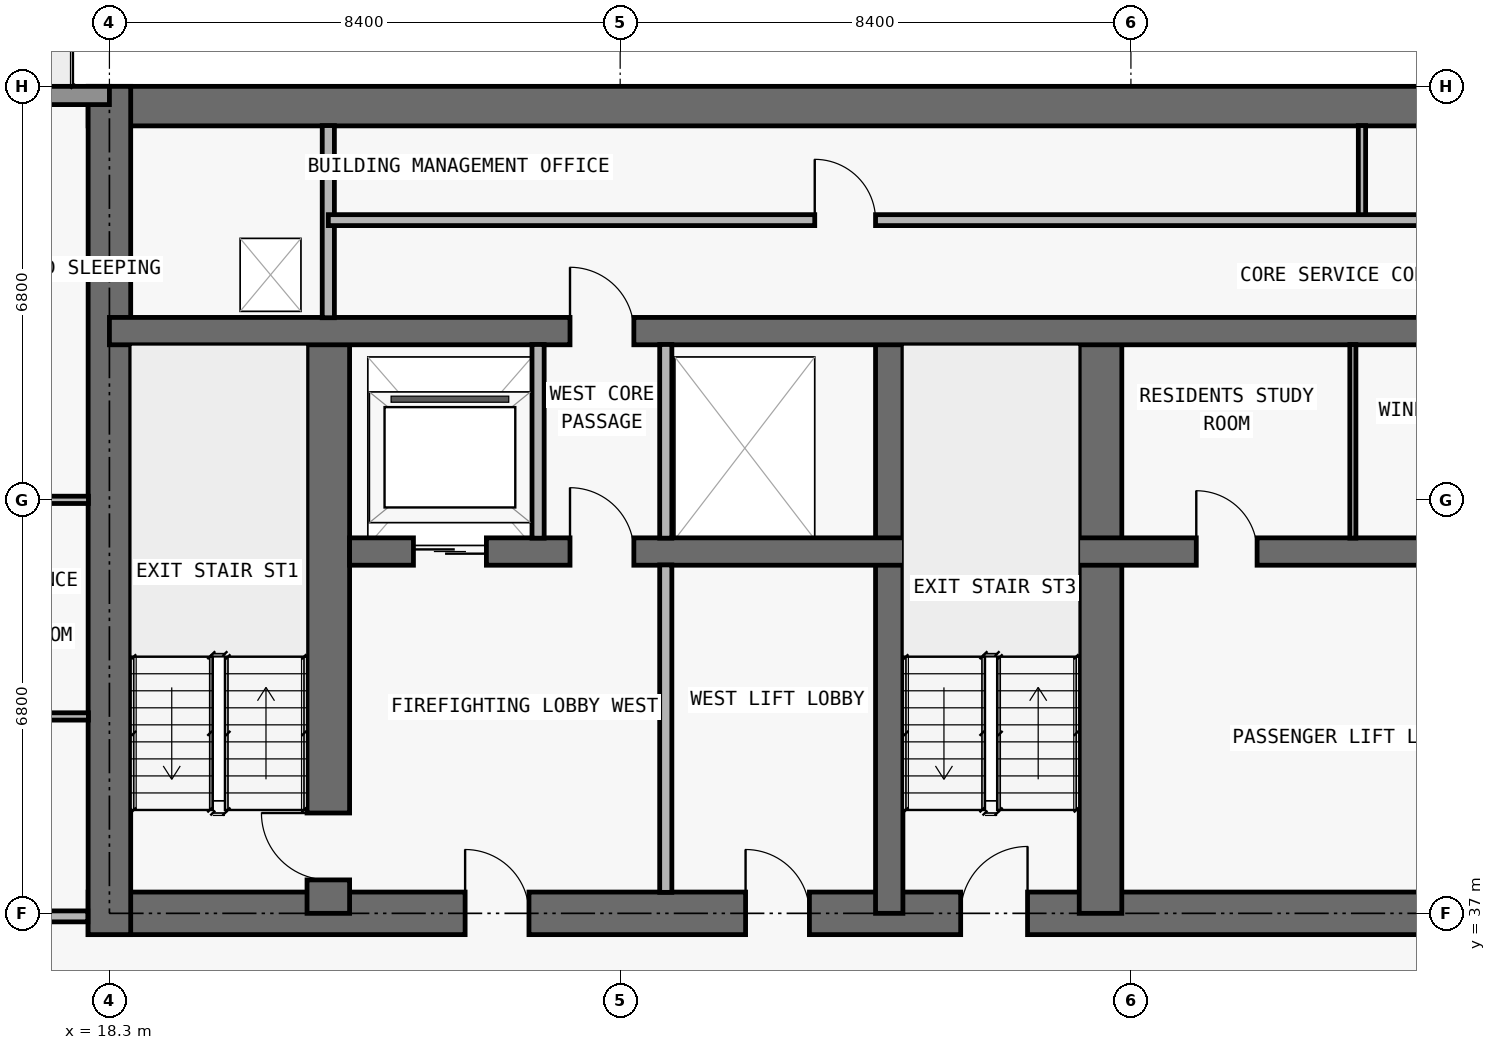
"""IFC4 building model, lengths in metres.
Left out: names, types, materials, properties, quantities, classifications, styles, units other than length and angle.
Written with IfcOpenShell. Run it as: python <this file> out.ifc"""

import sys

from ifc_helpers import new_model, si_unit, direction, frame, frame_2d, origin, place, context, subcontext, project, spatial, rectangle, extrude, element, fill, save


model = new_model("IFC4")
c1 = context("Model", 3, precision=1e-05, world=origin(), true_north=direction((0.0, 1.0)))
c2 = subcontext(c1, "Body", "Model", "MODEL_VIEW")
j1 = project(units=[si_unit("LENGTHUNIT", "METRE"), si_unit("PLANEANGLEUNIT", "RADIAN")], contexts=[c1])
p1 = place(None, origin())
s1 = spatial("IfcSite", under=j1, at=p1, CompositionType="ELEMENT")
p2 = place(p1, origin())
s2 = spatial("IfcBuilding", under=s1, at=p2, CompositionType="ELEMENT")
p3 = place(p2, frame((0.0, 0.0, 177.0)))
s3 = spatial("IfcBuildingStorey", under=s2, at=p3, CompositionType="ELEMENT", Elevation=177.0)
p4 = place(p3, frame((17.95, 37.0, 0.0), z_axis=(0.0, 0.0, 1.0), x_axis=(1.0, 0.0, 0.0)))
e1 = element("IfcWall", 1, at=p4, inside=s3, PredefinedType="SHEAR", context=c2, shape_type="SweptSolid", body=[
    extrude(rectangle(XDim=41.9, YDim=0.7, at=frame_2d((20.95, 0.0))), origin(), (0.0, 0.0, 1.0), 3.05),
])
p5 = place(p4, frame((14.35, 0.0, 0.0)))
e2 = element("IfcOpeningElement", 2, at=p5, cuts=e1, PredefinedType="OPENING", context=c2, shape_type="SweptSolid", body=[
    extrude(rectangle(XDim=1.1, YDim=2.15, at=frame_2d((0.55, 1.075))), frame((0.0, 0.36, 0.0), z_axis=(0.0, -1.0, 0.0), x_axis=(1.0, 0.0, 0.0)), (0.0, 0.0, 1.0), 0.72),
])
p6 = place(p4, frame((6.2, 0.0, 0.0)))
e3 = element("IfcOpeningElement", 3, at=p6, cuts=e1, PredefinedType="OPENING", context=c2, shape_type="SweptSolid", body=[
    extrude(rectangle(XDim=1.05, YDim=2.15, at=frame_2d((0.525, 1.075))), frame((0.0, 0.36, 0.0), z_axis=(0.0, -1.0, 0.0), x_axis=(1.0, 0.0, 0.0)), (0.0, 0.0, 1.0), 0.72),
])
p7 = place(p4, frame((34.7, 0.0, 0.0)))
e4 = element("IfcOpeningElement", 4, at=p7, cuts=e1, PredefinedType="OPENING", context=c2, shape_type="SweptSolid", body=[
    extrude(rectangle(XDim=1.05, YDim=2.15, at=frame_2d((0.525, 1.075))), frame((0.0, 0.36, 0.0), z_axis=(0.0, -1.0, 0.0), x_axis=(1.0, 0.0, 0.0)), (0.0, 0.0, 1.0), 0.72),
])
p8 = place(p4, frame((10.812, 0.0, 0.0)))
e5 = element("IfcOpeningElement", 5, at=p8, cuts=e1, PredefinedType="OPENING", context=c2, shape_type="SweptSolid", body=[
    extrude(rectangle(XDim=1.05, YDim=2.15, at=frame_2d((0.525, 1.075))), frame((0.0, 0.36, 0.0), z_axis=(0.0, -1.0, 0.0), x_axis=(1.0, 0.0, 0.0)), (0.0, 0.0, 1.0), 0.72),
])
p9 = place(p4, frame((24.05, 0.0, 0.0)))
e6 = element("IfcOpeningElement", 6, at=p9, cuts=e1, PredefinedType="OPENING", context=c2, shape_type="SweptSolid", body=[
    extrude(rectangle(XDim=1.05, YDim=2.15, at=frame_2d((0.525, 1.075))), frame((0.0, 0.36, 0.0), z_axis=(0.0, -1.0, 0.0), x_axis=(1.0, 0.0, 0.0)), (0.0, 0.0, 1.0), 0.72),
])
p10 = place(p3, frame((17.95, 50.275, 0.0), z_axis=(0.0, 0.0, 1.0), x_axis=(1.0, 0.0, 0.0)))
e7 = element("IfcWall", 7, at=p10, inside=s3, PredefinedType="SHEAR", context=c2, shape_type="SweptSolid", body=[
    extrude(rectangle(XDim=41.9, YDim=0.65, at=frame_2d((20.95, 0.0))), origin(), (0.0, 0.0, 1.0), 3.05),
])
p11 = place(p3, frame((18.3, 36.65, 0.0), z_axis=(0.0, 0.0, 1.0), x_axis=(0.0, 1.0, 0.0)))
e8 = element("IfcWall", 8, at=p11, inside=s3, PredefinedType="SHEAR", context=c2, shape_type="SweptSolid", body=[
    extrude(rectangle(XDim=13.95, YDim=0.7, at=frame_2d((6.975, 0.0))), origin(), (0.0, 0.0, 1.0), 3.05),
])
p12 = place(p3, frame((21.9, 37.0, 0.0), z_axis=(0.0, 0.0, 1.0), x_axis=(0.0, 1.0, 0.0)))
e9 = element("IfcWall", 9, at=p12, inside=s3, PredefinedType="SHEAR", context=c2, shape_type="SweptSolid", body=[
    extrude(rectangle(XDim=9.575, YDim=0.7, at=frame_2d((4.788, 0.0))), origin(), (0.0, 0.0, 1.0), 3.05),
])
p13 = place(p12, frame((0.55, 0.0, 0.0)))
e10 = element("IfcOpeningElement", 10, at=p13, cuts=e9, PredefinedType="OPENING", context=c2, shape_type="SweptSolid", body=[
    extrude(rectangle(XDim=1.1, YDim=2.15, at=frame_2d((0.55, 1.075))), frame((0.0, 0.36, 0.0), z_axis=(0.0, -1.0, 0.0), x_axis=(1.0, 0.0, 0.0)), (0.0, 0.0, 1.0), 0.72),
])
p14 = place(p3, frame((31.125, 37.0, 0.0), z_axis=(0.0, 0.0, 1.0), x_axis=(0.0, 1.0, 0.0)))
e11 = element("IfcWall", 11, at=p14, inside=s3, PredefinedType="SHEAR", context=c2, shape_type="SweptSolid", body=[
    extrude(rectangle(XDim=9.575, YDim=0.45, at=frame_2d((4.788, 0.0))), origin(), (0.0, 0.0, 1.0), 3.05),
])
p15 = place(p3, frame((34.6, 37.0, 0.0), z_axis=(0.0, 0.0, 1.0), x_axis=(0.0, 1.0, 0.0)))
e12 = element("IfcWall", 12, at=p15, inside=s3, PredefinedType="SHEAR", context=c2, shape_type="SweptSolid", body=[
    extrude(rectangle(XDim=9.575, YDim=0.7, at=frame_2d((4.788, 0.0))), origin(), (0.0, 0.0, 1.0), 3.05),
])
p16 = place(p3, frame((22.25, 42.95, 0.0), z_axis=(0.0, 0.0, 1.0), x_axis=(1.0, 0.0, 0.0)))
e13 = element("IfcWall", 13, at=p16, inside=s3, PredefinedType="SHEAR", context=c2, shape_type="SweptSolid", body=[
    extrude(rectangle(XDim=33.3, YDim=0.45, at=frame_2d((16.65, 0.0))), origin(), (0.0, 0.0, 1.0), 3.05),
])
p17 = place(p16, frame((1.05, 0.0, 0.0)))
e14 = element("IfcOpeningElement", 14, at=p17, cuts=e13, PredefinedType="OPENING", context=c2, shape_type="SweptSolid", body=[
    extrude(rectangle(XDim=1.2, YDim=2.2, at=frame_2d((0.6, 1.1))), frame((0.0, 0.235, 0.0), z_axis=(0.0, -1.0, 0.0), x_axis=(1.0, 0.0, 0.0)), (0.0, 0.0, 1.0), 0.47),
])
p18 = place(p16, frame((31.05, 0.0, 0.0)))
e15 = element("IfcOpeningElement", 15, at=p18, cuts=e13, PredefinedType="OPENING", context=c2, shape_type="SweptSolid", body=[
    extrude(rectangle(XDim=1.2, YDim=2.2, at=frame_2d((0.6, 1.1))), frame((0.0, 0.235, 0.0), z_axis=(0.0, -1.0, 0.0), x_axis=(1.0, 0.0, 0.0)), (0.0, 0.0, 1.0), 0.47),
])
p19 = place(p16, frame((21.4, 0.0, 0.0)))
e16 = element("IfcOpeningElement", 16, at=p19, cuts=e13, PredefinedType="OPENING", context=c2, shape_type="SweptSolid", body=[
    extrude(rectangle(XDim=1.1, YDim=2.2, at=frame_2d((0.55, 1.1))), frame((0.0, 0.235, 0.0), z_axis=(0.0, -1.0, 0.0), x_axis=(1.0, 0.0, 0.0)), (0.0, 0.0, 1.0), 0.47),
])
p20 = place(p16, frame((24.0, 0.0, 0.0)))
e17 = element("IfcOpeningElement", 17, at=p20, cuts=e13, PredefinedType="OPENING", context=c2, shape_type="SweptSolid", body=[
    extrude(rectangle(XDim=1.1, YDim=2.2, at=frame_2d((0.55, 1.1))), frame((0.0, 0.235, 0.0), z_axis=(0.0, -1.0, 0.0), x_axis=(1.0, 0.0, 0.0)), (0.0, 0.0, 1.0), 0.47),
])
p21 = place(p16, frame((3.625, 0.0, 0.0)))
e18 = element("IfcOpeningElement", 18, at=p21, cuts=e13, PredefinedType="OPENING", context=c2, shape_type="SweptSolid", body=[
    extrude(rectangle(XDim=1.05, YDim=2.15, at=frame_2d((0.525, 1.075))), frame((0.0, 0.235, 0.0), z_axis=(0.0, -1.0, 0.0), x_axis=(1.0, 0.0, 0.0)), (0.0, 0.0, 1.0), 0.47),
])
p22 = place(p16, frame((28.675, 0.0, 0.0)))
e19 = element("IfcOpeningElement", 19, at=p22, cuts=e13, PredefinedType="OPENING", context=c2, shape_type="SweptSolid", body=[
    extrude(rectangle(XDim=1.05, YDim=2.15, at=frame_2d((0.525, 1.075))), frame((0.0, 0.235, 0.0), z_axis=(0.0, -1.0, 0.0), x_axis=(1.0, 0.0, 0.0)), (0.0, 0.0, 1.0), 0.47),
])
p23 = place(p16, frame((13.925, 0.0, 0.0)))
e20 = element("IfcOpeningElement", 20, at=p23, cuts=e13, PredefinedType="OPENING", context=c2, shape_type="SweptSolid", body=[
    extrude(rectangle(XDim=1.0, YDim=2.2, at=frame_2d((0.5, 1.1))), frame((0.0, 0.235, 0.0), z_axis=(0.0, -1.0, 0.0), x_axis=(1.0, 0.0, 0.0)), (0.0, 0.0, 1.0), 0.47),
])
p24 = place(p16, frame((18.05, 0.0, 0.0)))
e21 = element("IfcOpeningElement", 21, at=p24, cuts=e13, PredefinedType="OPENING", context=c2, shape_type="SweptSolid", body=[
    extrude(rectangle(XDim=1.0, YDim=2.2, at=frame_2d((0.5, 1.1))), frame((0.0, 0.235, 0.0), z_axis=(0.0, -1.0, 0.0), x_axis=(1.0, 0.0, 0.0)), (0.0, 0.0, 1.0), 0.47),
])
p25 = place(p3, frame((18.3, 46.575, 0.0), z_axis=(0.0, 0.0, 1.0), x_axis=(1.0, 0.0, 0.0)))
e22 = element("IfcWall", 22, at=p25, inside=s3, PredefinedType="SHEAR", context=c2, shape_type="SweptSolid", body=[
    extrude(rectangle(XDim=41.2, YDim=0.45, at=frame_2d((20.6, 0.0))), origin(), (0.0, 0.0, 1.0), 3.05),
])
p26 = place(p25, frame((7.575, 0.0, 0.0)))
e23 = element("IfcOpeningElement", 23, at=p26, cuts=e22, PredefinedType="OPENING", context=c2, shape_type="SweptSolid", body=[
    extrude(rectangle(XDim=1.05, YDim=2.15, at=frame_2d((0.525, 1.075))), frame((0.0, 0.235, 0.0), z_axis=(0.0, -1.0, 0.0), x_axis=(1.0, 0.0, 0.0)), (0.0, 0.0, 1.0), 0.47),
])
p27 = place(p25, frame((32.625, 0.0, 0.0)))
e24 = element("IfcOpeningElement", 24, at=p27, cuts=e22, PredefinedType="OPENING", context=c2, shape_type="SweptSolid", body=[
    extrude(rectangle(XDim=1.05, YDim=2.15, at=frame_2d((0.525, 1.075))), frame((0.0, 0.235, 0.0), z_axis=(0.0, -1.0, 0.0), x_axis=(1.0, 0.0, 0.0)), (0.0, 0.0, 1.0), 0.47),
])
p28 = place(p3, frame((10.1, 50.45, 0.0), z_axis=(0.0, 0.0, 1.0), x_axis=(1.0, 0.0, 0.0)))
e25 = element("IfcWall", 25, at=p28, inside=s3, PredefinedType="STANDARD", context=c2, shape_type="SweptSolid", body=[
    extrude(rectangle(XDim=8.2, YDim=0.3, at=frame_2d((4.1, 0.0))), origin(), (0.0, 0.0, 1.0), 3.05),
])
p29 = place(p28, frame((3.1, 0.0, 0.0)))
e26 = element("IfcOpeningElement", 26, at=p29, cuts=e25, PredefinedType="OPENING", context=c2, shape_type="SweptSolid", body=[
    extrude(rectangle(XDim=2.0, YDim=2.3, at=frame_2d((1.0, 1.15))), frame((0.0, 0.16, 0.0), z_axis=(0.0, -1.0, 0.0), x_axis=(1.0, 0.0, 0.0)), (0.0, 0.0, 1.0), 0.32),
])
p30 = place(p3, frame((21.9, 46.795, 0.0), z_axis=(0.0, 0.0, 1.0), x_axis=(0.0, 1.0, 0.0)))
e27 = element("IfcWall", 27, at=p30, inside=s3, PredefinedType="PARTITIONING", context=c2, shape_type="SweptSolid", body=[
    extrude(rectangle(XDim=3.16, YDim=0.2, at=frame_2d((1.58, 0.0))), origin(), (0.0, 0.0, 1.0), 3.05),
])
p31 = place(p3, frame((25.35, 43.17, 0.0), z_axis=(0.0, 0.0, 1.0), x_axis=(0.0, 1.0, 0.0)))
e28 = element("IfcWall", 28, at=p31, inside=s3, PredefinedType="PARTITIONING", context=c2, shape_type="SweptSolid", body=[
    extrude(rectangle(XDim=3.185, YDim=0.2, at=frame_2d((1.593, 0.0))), origin(), (0.0, 0.0, 1.0), 3.05),
])
p32 = place(p3, frame((27.45, 37.345, 0.0), z_axis=(0.0, 0.0, 1.0), x_axis=(0.0, 1.0, 0.0)))
e29 = element("IfcWall", 29, at=p32, inside=s3, PredefinedType="PARTITIONING", context=c2, shape_type="SweptSolid", body=[
    extrude(rectangle(XDim=5.385, YDim=0.2, at=frame_2d((2.692, 0.0))), origin(), (0.0, 0.0, 1.0), 3.05),
])
p33 = place(p3, frame((27.45, 43.17, 0.0), z_axis=(0.0, 0.0, 1.0), x_axis=(0.0, 1.0, 0.0)))
e30 = element("IfcWall", 30, at=p33, inside=s3, PredefinedType="PARTITIONING", context=c2, shape_type="SweptSolid", body=[
    extrude(rectangle(XDim=3.185, YDim=0.2, at=frame_2d((1.593, 0.0))), origin(), (0.0, 0.0, 1.0), 3.05),
])
p34 = place(p3, frame((38.75, 43.17, 0.0), z_axis=(0.0, 0.0, 1.0), x_axis=(0.0, 1.0, 0.0)))
e31 = element("IfcWall", 31, at=p34, inside=s3, PredefinedType="MOVABLE", context=c2, shape_type="SweptSolid", body=[
    extrude(rectangle(XDim=3.185, YDim=0.1, at=frame_2d((1.593, 0.0))), origin(), (0.0, 0.0, 1.0), 3.05),
])
p35 = place(p3, frame((38.9, 48.4, 0.0), z_axis=(0.0, 0.0, 1.0), x_axis=(0.0, 1.0, 0.0)))
e32 = element("IfcWall", 32, at=p35, inside=s3, PredefinedType="PARTITIONING", context=c2, shape_type="SweptSolid", body=[
    extrude(rectangle(XDim=1.555, YDim=0.12, at=frame_2d((0.778, 0.0))), origin(), (0.0, 0.0, 1.0), 3.05),
])
p36 = place(p3, frame((10.1, 36.95, 0.0), z_axis=(0.0, 0.0, 1.0), x_axis=(1.0, 0.0, 0.0)))
e33 = element("IfcWall", 33, at=p36, inside=s3, PredefinedType="PARTITIONING", context=c2, shape_type="SweptSolid", body=[
    extrude(rectangle(XDim=7.845, YDim=0.18, at=frame_2d((3.922, 0.0))), origin(), (0.0, 0.0, 1.0), 3.05),
])
p37 = place(p36, frame((3.46, 0.0, 0.0)))
e34 = element("IfcOpeningElement", 34, at=p37, cuts=e33, PredefinedType="OPENING", context=c2, shape_type="SweptSolid", body=[
    extrude(rectangle(XDim=1.0, YDim=2.2, at=frame_2d((0.5, 1.1))), frame((0.0, 0.1, 0.0), z_axis=(0.0, -1.0, 0.0), x_axis=(1.0, 0.0, 0.0)), (0.0, 0.0, 1.0), 0.2),
])
p38 = place(p3, frame((15.6, 40.238, 0.0), z_axis=(0.0, 0.0, 1.0), x_axis=(1.0, 0.0, 0.0)))
e35 = element("IfcWall", 35, at=p38, inside=s3, PredefinedType="PARTITIONING", context=c2, shape_type="SweptSolid", body=[
    extrude(rectangle(XDim=2.355, YDim=0.12, at=frame_2d((1.177, 0.0))), origin(), (0.0, 0.0, 1.0), 3.05),
])
p39 = place(p3, frame((6.395, 43.8, 0.0), z_axis=(0.0, 0.0, 1.0), x_axis=(1.0, 0.0, 0.0)))
e36 = element("IfcWall", 36, at=p39, inside=s3, PredefinedType="PARTITIONING", context=c2, shape_type="SweptSolid", body=[
    extrude(rectangle(XDim=11.56, YDim=0.12, at=frame_2d((5.78, 0.0))), origin(), (0.0, 0.0, 1.0), 2.418),
])
p40 = place(p39, frame((7.215, 0.0, 0.0)))
e37 = element("IfcOpeningElement", 37, at=p40, cuts=e36, PredefinedType="OPENING", context=c2, shape_type="SweptSolid", body=[
    extrude(rectangle(XDim=0.9, YDim=2.15, at=frame_2d((0.45, 1.075))), frame((0.0, 0.07, 0.0), z_axis=(0.0, -1.0, 0.0), x_axis=(1.0, 0.0, 0.0)), (0.0, 0.0, 1.0), 0.14),
])
p41 = place(p39, frame((9.958, 0.0, 0.0)))
e38 = element("IfcOpeningElement", 38, at=p41, cuts=e36, PredefinedType="OPENING", context=c2, shape_type="SweptSolid", body=[
    extrude(rectangle(XDim=0.85, YDim=2.1, at=frame_2d((0.425, 1.05))), frame((0.0, 0.07, 0.0), z_axis=(0.0, -1.0, 0.0), x_axis=(1.0, 0.0, 0.0)), (0.0, 0.0, 1.0), 0.14),
])
p42 = place(p3, frame((21.9, 48.4, 0.0), z_axis=(0.0, 0.0, 1.0), x_axis=(1.0, 0.0, 0.0)))
e39 = element("IfcWall", 39, at=p42, inside=s3, PredefinedType="PARTITIONING", context=c2, shape_type="SweptSolid", body=[
    extrude(rectangle(XDim=34.0, YDim=0.18, at=frame_2d((17.0, 0.0))), origin(), (0.0, 0.0, 1.0), 3.05),
])
p43 = place(p42, frame((8.0, 0.0, 0.0)))
e40 = element("IfcOpeningElement", 40, at=p43, cuts=e39, PredefinedType="OPENING", context=c2, shape_type="SweptSolid", body=[
    extrude(rectangle(XDim=1.0, YDim=2.2, at=frame_2d((0.5, 1.1))), frame((0.0, 0.1, 0.0), z_axis=(0.0, -1.0, 0.0), x_axis=(1.0, 0.0, 0.0)), (0.0, 0.0, 1.0), 0.2),
])
p44 = place(p42, frame((25.0, 0.0, 0.0)))
e41 = element("IfcOpeningElement", 41, at=p44, cuts=e39, PredefinedType="OPENING", context=c2, shape_type="SweptSolid", body=[
    extrude(rectangle(XDim=1.0, YDim=2.2, at=frame_2d((0.5, 1.1))), frame((0.0, 0.1, 0.0), z_axis=(0.0, -1.0, 0.0), x_axis=(1.0, 0.0, 0.0)), (0.0, 0.0, 1.0), 0.2),
])
p45 = place(p17, origin())
e42 = element("IfcDoor", 42, at=p45, inside=s3, OperationType="DOUBLE_DOOR_SLIDING", PredefinedType="DOOR", context=c2, shape_type="SweptSolid", body=[
    extrude(rectangle(XDim=1.2, YDim=2.2, at=frame_2d((0.6, 1.1))), frame((0.0, 0.025, 0.0), z_axis=(0.0, -1.0, 0.0), x_axis=(1.0, 0.0, 0.0)), (0.0, 0.0, 1.0), 0.05),
])
fill(e14, e42)
p46 = place(p5, origin())
e43 = element("IfcDoor", 43, at=p46, inside=s3, OperationType="SINGLE_SWING_RIGHT", PredefinedType="DOOR", context=c2, shape_type="SweptSolid", body=[
    extrude(rectangle(XDim=1.1, YDim=2.15, at=frame_2d((0.55, 1.075))), frame((0.0, 0.025, 0.0), z_axis=(0.0, -1.0, 0.0), x_axis=(1.0, 0.0, 0.0)), (0.0, 0.0, 1.0), 0.05),
])
fill(e2, e43)
p47 = place(p6, origin())
e44 = element("IfcDoor", 44, at=p47, inside=s3, OperationType="SINGLE_SWING_LEFT", PredefinedType="DOOR", context=c2, shape_type="SweptSolid", body=[
    extrude(rectangle(XDim=1.05, YDim=2.15, at=frame_2d((0.525, 1.075))), frame((0.0, 0.025, 0.0), z_axis=(0.0, -1.0, 0.0), x_axis=(1.0, 0.0, 0.0)), (0.0, 0.0, 1.0), 0.05),
])
fill(e3, e44)
p48 = place(p13, origin())
e45 = element("IfcDoor", 45, at=p48, inside=s3, OperationType="SINGLE_SWING_RIGHT", PredefinedType="DOOR", context=c2, shape_type="SweptSolid", body=[
    extrude(rectangle(XDim=1.1, YDim=2.15, at=frame_2d((0.55, 1.075))), frame((0.0, 0.025, 0.0), z_axis=(0.0, -1.0, 0.0), x_axis=(1.0, 0.0, 0.0)), (0.0, 0.0, 1.0), 0.05),
])
fill(e10, e45)
p49 = place(p21, origin())
e46 = element("IfcDoor", 46, at=p49, inside=s3, OperationType="SINGLE_SWING_LEFT", PredefinedType="DOOR", context=c2, shape_type="SweptSolid", body=[
    extrude(rectangle(XDim=1.05, YDim=2.15, at=frame_2d((0.525, 1.075))), frame((0.0, 0.025, 0.0), z_axis=(0.0, -1.0, 0.0), x_axis=(1.0, 0.0, 0.0)), (0.0, 0.0, 1.0), 0.05),
])
fill(e18, e46)
p50 = place(p8, origin())
e47 = element("IfcDoor", 47, at=p50, inside=s3, OperationType="SINGLE_SWING_LEFT", PredefinedType="DOOR", context=c2, shape_type="SweptSolid", body=[
    extrude(rectangle(XDim=1.05, YDim=2.15, at=frame_2d((0.525, 1.075))), frame((0.0, 0.025, 0.0), z_axis=(0.0, -1.0, 0.0), x_axis=(1.0, 0.0, 0.0)), (0.0, 0.0, 1.0), 0.05),
])
fill(e5, e47)
p51 = place(p23, origin())
e48 = element("IfcDoor", 48, at=p51, inside=s3, OperationType="SINGLE_SWING_LEFT", PredefinedType="DOOR", context=c2, shape_type="SweptSolid", body=[
    extrude(rectangle(XDim=1.0, YDim=2.2, at=frame_2d((0.5, 1.1))), frame((0.0, 0.025, 0.0), z_axis=(0.0, -1.0, 0.0), x_axis=(1.0, 0.0, 0.0)), (0.0, 0.0, 1.0), 0.05),
])
fill(e20, e48)
p52 = place(p26, origin())
e49 = element("IfcDoor", 49, at=p52, inside=s3, OperationType="SINGLE_SWING_LEFT", PredefinedType="DOOR", context=c2, shape_type="SweptSolid", body=[
    extrude(rectangle(XDim=1.05, YDim=2.15, at=frame_2d((0.525, 1.075))), frame((0.0, 0.025, 0.0), z_axis=(0.0, -1.0, 0.0), x_axis=(1.0, 0.0, 0.0)), (0.0, 0.0, 1.0), 0.05),
])
fill(e23, e49)
p53 = place(p43, origin())
e50 = element("IfcDoor", 50, at=p53, inside=s3, OperationType="SINGLE_SWING_LEFT", PredefinedType="DOOR", context=c2, shape_type="SweptSolid", body=[
    extrude(rectangle(XDim=1.0, YDim=2.2, at=frame_2d((0.5, 1.1))), frame((0.0, 0.025, 0.0), z_axis=(0.0, -1.0, 0.0), x_axis=(1.0, 0.0, 0.0)), (0.0, 0.0, 1.0), 0.05),
])
fill(e40, e50)
save(model, sys.argv[1])
